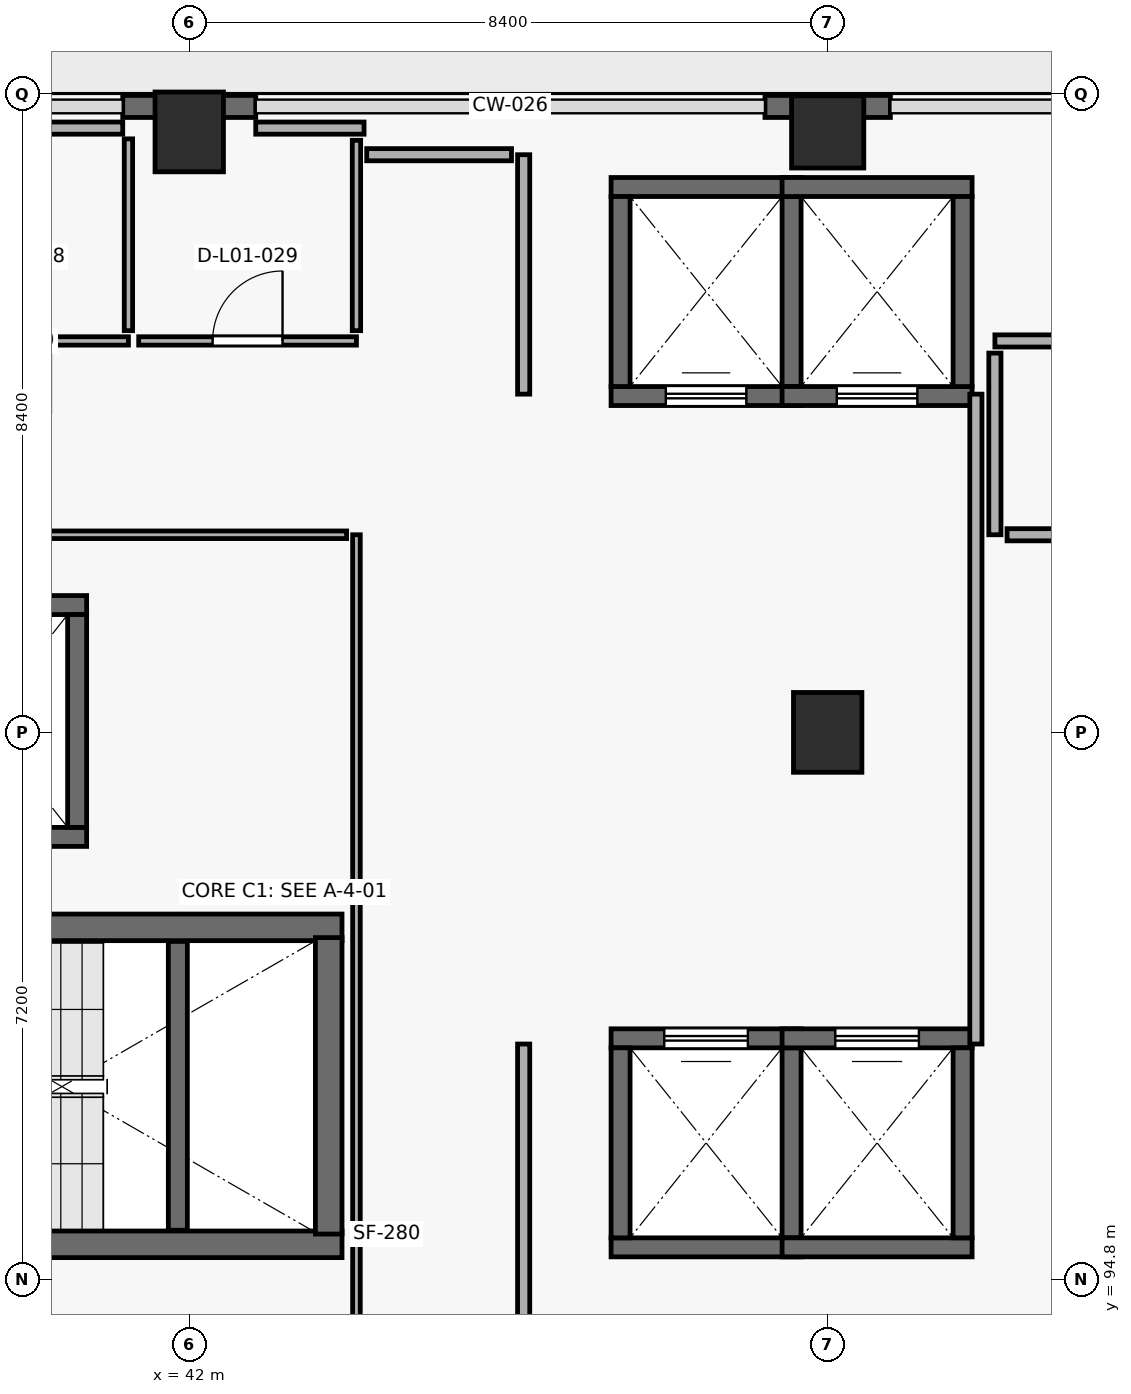
"""IFC4 building model, lengths in metres.
Left out: names, types, materials, properties, quantities, classifications, styles, units other than length and angle.
Written with IfcOpenShell. Run it as: python <this file> out.ifc"""

import sys

from ifc_helpers import new_model, si_unit, direction, frame, frame_2d, origin, origin_2d, place, context, subcontext, project, spatial, rectangle, extrude, element, fill, save


model = new_model("IFC4")
c1 = context("Model", 3, precision=1e-05, world=origin(), true_north=direction((0.0, 1.0)))
c2 = subcontext(c1, "Body", "Model", "MODEL_VIEW")
j1 = project(units=[si_unit("LENGTHUNIT", "METRE"), si_unit("PLANEANGLEUNIT", "RADIAN")], contexts=[c1])
p1 = place(None, origin())
s1 = spatial("IfcSite", under=j1, at=p1, CompositionType="ELEMENT")
p2 = place(p1, origin())
s2 = spatial("IfcBuilding", under=s1, at=p2, CompositionType="ELEMENT")
p3 = place(p2, origin())
s3 = spatial("IfcBuildingStorey", under=s2, at=p3, CompositionType="ELEMENT", Elevation=0.0)
for number, where, z_axis, x_axis in (
    (1, (42.0, 109.9, 0.0), (0.0, 0.0, 1.0), (1.0, 0.0, 0.0)),
    (2, (50.4, 102.0, 0.0), (0.0, 0.0, 1.0), (1.0, 0.0, 0.0)),
):
    element("IfcColumn", number, at=place(p3, frame(where, z_axis=z_axis, x_axis=x_axis)), inside=s3, PredefinedType="COLUMN", context=c2, shape_type="SweptSolid", body=[
        extrude(rectangle(XDim=0.9, YDim=1.05, at=origin_2d()), origin(), (0.0, 0.0, 1.0), 5.4),
    ])
p4 = place(p3, frame((50.4, 109.9, 0.0), z_axis=(0.0, 0.0, 1.0), x_axis=(1.0, 0.0, 0.0)))
e3 = element("IfcColumn", 3, at=p4, inside=s3, PredefinedType="COLUMN", context=c2, shape_type="SweptSolid", body=[
    extrude(rectangle(XDim=0.95, YDim=0.95, at=origin_2d()), origin(), (0.0, 0.0, 1.0), 5.4),
])
p5 = place(p3, frame((41.125, 110.235, 0.0), z_axis=(0.0, 0.0, 1.0), x_axis=(1.0, 0.0, 0.0)))
e4 = element("IfcWall", 4, at=p5, inside=s3, PredefinedType="SOLIDWALL", context=c2, shape_type="SweptSolid", body=[
    extrude(rectangle(XDim=1.75, YDim=0.29, at=frame_2d((0.875, 0.0))), origin(), (0.0, 0.0, 1.0), 5.12),
])
p6 = place(p3, frame((49.575, 110.235, 0.0), z_axis=(0.0, 0.0, 1.0), x_axis=(1.0, 0.0, 0.0)))
e5 = element("IfcWall", 5, at=p6, inside=s3, PredefinedType="SOLIDWALL", context=c2, shape_type="SweptSolid", body=[
    extrude(rectangle(XDim=1.65, YDim=0.29, at=frame_2d((0.825, 0.0))), origin(), (0.0, 0.0, 1.0), 5.12),
])
p7 = place(p3, frame((34.79, 95.265, 0.0), z_axis=(0.0, 0.0, 1.0), x_axis=(1.0, 0.0, 0.0)))
e6 = element("IfcWall", 6, at=p7, inside=s3, PredefinedType="SHEAR", context=c2, shape_type="SweptSolid", body=[
    extrude(rectangle(XDim=9.22, YDim=0.35, at=frame_2d((4.61, 0.0))), origin(), (0.0, 0.0, 1.0), 5.12),
])
p8 = place(p7, frame((0.45, 0.0, 0.0)))
e7 = element("IfcOpeningElement", 7, at=p8, cuts=e6, PredefinedType="OPENING", context=c2, shape_type="SweptSolid", body=[
    extrude(rectangle(XDim=1.25, YDim=2.2, at=frame_2d((0.625, 1.1))), frame((0.0, 0.185, 0.0), z_axis=(0.0, -1.0, 0.0), x_axis=(1.0, 0.0, 0.0)), (0.0, 0.0, 1.0), 0.37),
])
p9 = place(p3, frame((44.01, 99.435, 0.0), z_axis=(0.0, 0.0, 1.0), x_axis=(-1.0, 0.0, 0.0)))
e8 = element("IfcWall", 8, at=p9, inside=s3, PredefinedType="SHEAR", context=c2, shape_type="SweptSolid", body=[
    extrude(rectangle(XDim=9.22, YDim=0.35, at=frame_2d((4.61, 0.0))), origin(), (0.0, 0.0, 1.0), 5.12),
])
p10 = place(p9, frame((7.72, 0.0, 0.0)))
e9 = element("IfcOpeningElement", 9, at=p10, cuts=e8, PredefinedType="OPENING", context=c2, shape_type="SweptSolid", body=[
    extrude(rectangle(XDim=1.2, YDim=2.2, at=frame_2d((0.6, 1.1))), frame((0.0, 0.185, 0.0), z_axis=(0.0, -1.0, 0.0), x_axis=(1.0, 0.0, 0.0)), (0.0, 0.0, 1.0), 0.37),
])
p11 = place(p3, frame((43.835, 99.3, 0.0), z_axis=(0.0, 0.0, 1.0), x_axis=(0.0, -1.0, 0.0)))
e10 = element("IfcWall", 10, at=p11, inside=s3, PredefinedType="SHEAR", context=c2, shape_type="SweptSolid", body=[
    extrude(rectangle(XDim=3.9, YDim=0.35, at=frame_2d((1.95, 0.0))), origin(), (0.0, 0.0, 1.0), 5.12),
])
p12 = place(p3, frame((41.85, 95.45, 0.0), z_axis=(0.0, 0.0, 1.0), x_axis=(0.0, 1.0, 0.0)))
e11 = element("IfcWall", 11, at=p12, inside=s3, PredefinedType="SHEAR", context=c2, shape_type="SweptSolid", body=[
    extrude(rectangle(XDim=3.8, YDim=0.25, at=frame_2d((1.9, 0.0))), origin(), (0.0, 0.0, 1.0), 2.52),
])
p13 = place(p3, frame((47.55, 95.225, 0.0), z_axis=(0.0, 0.0, 1.0), x_axis=(1.0, 0.0, 0.0)))
e12 = element("IfcWall", 12, at=p13, inside=s3, PredefinedType="SHEAR", context=c2, shape_type="SweptSolid", body=[
    extrude(rectangle(XDim=2.5, YDim=0.25, at=frame_2d((1.25, 0.0))), origin(), (0.0, 0.0, 1.0), 5.12),
])
p14 = place(p3, frame((50.05, 97.975, 0.0), z_axis=(0.0, 0.0, 1.0), x_axis=(-1.0, 0.0, 0.0)))
e13 = element("IfcWall", 13, at=p14, inside=s3, PredefinedType="SHEAR", context=c2, shape_type="SweptSolid", body=[
    extrude(rectangle(XDim=2.5, YDim=0.25, at=frame_2d((1.25, 0.0))), origin(), (0.0, 0.0, 1.0), 5.12),
])
p15 = place(p14, frame((0.7, 0.0, 0.0)))
e14 = element("IfcOpeningElement", 14, at=p15, cuts=e13, PredefinedType="OPENING", context=c2, shape_type="SweptSolid", body=[
    extrude(rectangle(XDim=1.1, YDim=2.2, at=frame_2d((0.55, 1.1))), frame((0.0, 0.135, 0.0), z_axis=(0.0, -1.0, 0.0), x_axis=(1.0, 0.0, 0.0)), (0.0, 0.0, 1.0), 0.27),
])
for number, where, z_axis, x_axis in (
    (15, (47.675, 95.35, 0.0), (0.0, 0.0, 1.0), (0.0, 1.0, 0.0)),
    (16, (49.925, 97.85, 0.0), (0.0, 0.0, 1.0), (0.0, -1.0, 0.0)),
    (17, (49.8, 95.225, 0.0), (0.0, 0.0, 1.0), (1.0, 0.0, 0.0)),
):
    element("IfcWall", number, at=place(p3, frame(where, z_axis=z_axis, x_axis=x_axis)), inside=s3, PredefinedType="SHEAR", context=c2, shape_type="SweptSolid", body=[
        extrude(rectangle(XDim=2.5, YDim=0.25, at=frame_2d((1.25, 0.0))), origin(), (0.0, 0.0, 1.0), 5.12),
    ])
p16 = place(p3, frame((52.3, 97.975, 0.0), z_axis=(0.0, 0.0, 1.0), x_axis=(-1.0, 0.0, 0.0)))
e18 = element("IfcWall", 18, at=p16, inside=s3, PredefinedType="SHEAR", context=c2, shape_type="SweptSolid", body=[
    extrude(rectangle(XDim=2.5, YDim=0.25, at=frame_2d((1.25, 0.0))), origin(), (0.0, 0.0, 1.0), 5.12),
])
p17 = place(p16, frame((0.7, 0.0, 0.0)))
e19 = element("IfcOpeningElement", 19, at=p17, cuts=e18, PredefinedType="OPENING", context=c2, shape_type="SweptSolid", body=[
    extrude(rectangle(XDim=1.1, YDim=2.2, at=frame_2d((0.55, 1.1))), frame((0.0, 0.135, 0.0), z_axis=(0.0, -1.0, 0.0), x_axis=(1.0, 0.0, 0.0)), (0.0, 0.0, 1.0), 0.27),
])
p18 = place(p3, frame((52.175, 97.85, 0.0), z_axis=(0.0, 0.0, 1.0), x_axis=(0.0, -1.0, 0.0)))
e20 = element("IfcWall", 20, at=p18, inside=s3, PredefinedType="SHEAR", context=c2, shape_type="SweptSolid", body=[
    extrude(rectangle(XDim=2.5, YDim=0.25, at=frame_2d((1.25, 0.0))), origin(), (0.0, 0.0, 1.0), 5.12),
])
p19 = place(p3, frame((47.55, 106.425, 0.0), z_axis=(0.0, 0.0, 1.0), x_axis=(1.0, 0.0, 0.0)))
e21 = element("IfcWall", 21, at=p19, inside=s3, PredefinedType="SHEAR", context=c2, shape_type="SweptSolid", body=[
    extrude(rectangle(XDim=2.5, YDim=0.25, at=frame_2d((1.25, 0.0))), origin(), (0.0, 0.0, 1.0), 5.12),
])
p20 = place(p19, frame((0.72, 0.0, 0.0)))
e22 = element("IfcOpeningElement", 22, at=p20, cuts=e21, PredefinedType="OPENING", context=c2, shape_type="SweptSolid", body=[
    extrude(rectangle(XDim=1.06, YDim=2.2, at=frame_2d((0.53, 1.1))), frame((0.0, 0.135, 0.0), z_axis=(0.0, -1.0, 0.0), x_axis=(1.0, 0.0, 0.0)), (0.0, 0.0, 1.0), 0.27),
])
for number, where, z_axis, x_axis in (
    (23, (50.05, 109.175, 0.0), (0.0, 0.0, 1.0), (-1.0, 0.0, 0.0)),
    (24, (47.675, 106.55, 0.0), (0.0, 0.0, 1.0), (0.0, 1.0, 0.0)),
    (25, (49.925, 109.05, 0.0), (0.0, 0.0, 1.0), (0.0, -1.0, 0.0)),
):
    element("IfcWall", number, at=place(p3, frame(where, z_axis=z_axis, x_axis=x_axis)), inside=s3, PredefinedType="SHEAR", context=c2, shape_type="SweptSolid", body=[
        extrude(rectangle(XDim=2.5, YDim=0.25, at=frame_2d((1.25, 0.0))), origin(), (0.0, 0.0, 1.0), 5.12),
    ])
p21 = place(p3, frame((49.8, 106.425, 0.0), z_axis=(0.0, 0.0, 1.0), x_axis=(1.0, 0.0, 0.0)))
e26 = element("IfcWall", 26, at=p21, inside=s3, PredefinedType="SHEAR", context=c2, shape_type="SweptSolid", body=[
    extrude(rectangle(XDim=2.5, YDim=0.25, at=frame_2d((1.25, 0.0))), origin(), (0.0, 0.0, 1.0), 5.12),
])
p22 = place(p21, frame((0.72, 0.0, 0.0)))
e27 = element("IfcOpeningElement", 27, at=p22, cuts=e26, PredefinedType="OPENING", context=c2, shape_type="SweptSolid", body=[
    extrude(rectangle(XDim=1.06, YDim=2.2, at=frame_2d((0.53, 1.1))), frame((0.0, 0.135, 0.0), z_axis=(0.0, -1.0, 0.0), x_axis=(1.0, 0.0, 0.0)), (0.0, 0.0, 1.0), 0.27),
])
for number, where, z_axis, x_axis in (
    (28, (52.3, 109.175, 0.0), (0.0, 0.0, 1.0), (-1.0, 0.0, 0.0)),
    (29, (52.175, 109.05, 0.0), (0.0, 0.0, 1.0), (0.0, -1.0, 0.0)),
):
    element("IfcWall", number, at=place(p3, frame(where, z_axis=z_axis, x_axis=x_axis)), inside=s3, PredefinedType="SHEAR", context=c2, shape_type="SweptSolid", body=[
        extrude(rectangle(XDim=2.5, YDim=0.25, at=frame_2d((1.25, 0.0))), origin(), (0.0, 0.0, 1.0), 5.12),
    ])
for number, where, z_axis, x_axis in (
    (30, (37.95, 100.625, 0.0), (0.0, 0.0, 1.0), (1.0, 0.0, 0.0)),
    (31, (40.65, 103.675, 0.0), (0.0, 0.0, 1.0), (-1.0, 0.0, 0.0)),
):
    element("IfcWall", number, at=place(p3, frame(where, z_axis=z_axis, x_axis=x_axis)), inside=s3, PredefinedType="SHEAR", context=c2, shape_type="SweptSolid", body=[
        extrude(rectangle(XDim=2.7, YDim=0.25, at=frame_2d((1.35, 0.0))), origin(), (0.0, 0.0, 1.0), 5.12),
    ])
p23 = place(p3, frame((40.525, 103.55, 0.0), z_axis=(0.0, 0.0, 1.0), x_axis=(0.0, -1.0, 0.0)))
e32 = element("IfcWall", 32, at=p23, inside=s3, PredefinedType="SHEAR", context=c2, shape_type="SweptSolid", body=[
    extrude(rectangle(XDim=2.8, YDim=0.25, at=frame_2d((1.4, 0.0))), origin(), (0.0, 0.0, 1.0), 5.12),
])
p24 = place(p3, frame((44.2, 104.6, 0.0), z_axis=(0.0, 0.0, 1.0), x_axis=(0.0, -1.0, 0.0)))
e33 = element("IfcWall", 33, at=p24, inside=s3, PredefinedType="PARTITIONING", context=c2, shape_type="SweptSolid", body=[
    extrude(rectangle(XDim=10.75, YDim=0.1, at=frame_2d((5.375, 0.0))), origin(), (0.0, 0.0, 1.0), 5.12),
])
p25 = place(p3, frame((52.35, 97.9, 0.0), z_axis=(0.0, 0.0, 1.0), x_axis=(0.0, 1.0, 0.0)))
e34 = element("IfcWall", 34, at=p25, inside=s3, PredefinedType="PARTITIONING", context=c2, shape_type="SweptSolid", body=[
    extrude(rectangle(XDim=8.55, YDim=0.16, at=frame_2d((4.275, 0.0))), origin(), (0.0, 0.0, 1.0), 5.12),
])
p26 = place(p3, frame((60.1, 107.15, 0.0), z_axis=(0.0, 0.0, 1.0), x_axis=(-1.0, 0.0, 0.0)))
e35 = element("IfcWall", 35, at=p26, inside=s3, PredefinedType="PARTITIONING", context=c2, shape_type="SweptSolid", body=[
    extrude(rectangle(XDim=7.5, YDim=0.16, at=frame_2d((3.75, 0.0))), origin(), (0.0, 0.0, 1.0), 5.12),
])
p27 = place(p3, frame((44.3, 109.95, 0.0), z_axis=(0.0, 0.0, 1.0), x_axis=(-1.0, 0.0, 0.0)))
e36 = element("IfcWall", 36, at=p27, inside=s3, PredefinedType="PARTITIONING", context=c2, shape_type="SweptSolid", body=[
    extrude(rectangle(XDim=1.425, YDim=0.16, at=frame_2d((0.712, 0.0))), origin(), (0.0, 0.0, 1.0), 4.36),
])
p28 = place(p3, frame((41.125, 109.95, 0.0), z_axis=(0.0, 0.0, 1.0), x_axis=(-1.0, 0.0, 0.0)))
e37 = element("IfcWall", 37, at=p28, inside=s3, PredefinedType="PARTITIONING", context=c2, shape_type="SweptSolid", body=[
    extrude(rectangle(XDim=3.025, YDim=0.16, at=frame_2d((1.512, 0.0))), origin(), (0.0, 0.0, 1.0), 4.36),
])
p29 = place(p3, frame((38.48, 104.6, 0.0), z_axis=(0.0, 0.0, 1.0), x_axis=(1.0, 0.0, 0.0)))
e38 = element("IfcWall", 38, at=p29, inside=s3, PredefinedType="PARTITIONING", context=c2, shape_type="SweptSolid", body=[
    extrude(rectangle(XDim=5.59, YDim=0.1, at=frame_2d((2.795, 0.0))), origin(), (0.0, 0.0, 1.0), 5.12),
])
p30 = place(p3, frame((46.4, 94.01, 0.0), z_axis=(0.0, 0.0, 1.0), x_axis=(0.0, 1.0, 0.0)))
e39 = element("IfcWall", 39, at=p30, inside=s3, PredefinedType="PARTITIONING", context=c2, shape_type="SweptSolid", body=[
    extrude(rectangle(XDim=3.89, YDim=0.16, at=frame_2d((1.945, 0.0))), origin(), (0.0, 0.0, 1.0), 5.12),
])
p31 = place(p3, frame((46.4, 106.45, 0.0), z_axis=(0.0, 0.0, 1.0), x_axis=(0.0, 1.0, 0.0)))
e40 = element("IfcWall", 40, at=p31, inside=s3, PredefinedType="PARTITIONING", context=c2, shape_type="SweptSolid", body=[
    extrude(rectangle(XDim=3.15, YDim=0.16, at=frame_2d((1.575, 0.0))), origin(), (0.0, 0.0, 1.0), 5.12),
])
p32 = place(p3, frame((41.2, 107.15, 0.0), z_axis=(0.0, 0.0, 1.0), x_axis=(-1.0, 0.0, 0.0)))
e41 = element("IfcWall", 41, at=p32, inside=s3, PredefinedType="PARTITIONING", context=c2, shape_type="SweptSolid", body=[
    extrude(rectangle(XDim=3.0, YDim=0.11, at=frame_2d((1.5, 0.0))), origin(), (0.0, 0.0, 1.0), 5.12),
])
p33 = place(p32, frame((1.02, 0.0, 0.0)))
e42 = element("IfcOpeningElement", 42, at=p33, cuts=e41, PredefinedType="OPENING", context=c2, shape_type="SweptSolid", body=[
    extrude(rectangle(XDim=0.96, YDim=2.14, at=frame_2d((0.48, 1.07))), frame((0.0, 0.065, 0.0), z_axis=(0.0, -1.0, 0.0), x_axis=(1.0, 0.0, 0.0)), (0.0, 0.0, 1.0), 0.13),
])
p34 = place(p3, frame((44.2, 107.15, 0.0), z_axis=(0.0, 0.0, 1.0), x_axis=(-1.0, 0.0, 0.0)))
e43 = element("IfcWall", 43, at=p34, inside=s3, PredefinedType="PARTITIONING", context=c2, shape_type="SweptSolid", body=[
    extrude(rectangle(XDim=2.865, YDim=0.11, at=frame_2d((1.433, 0.0))), origin(), (0.0, 0.0, 1.0), 5.12),
])
p35 = place(p34, frame((0.972, 0.0, 0.0)))
e44 = element("IfcOpeningElement", 44, at=p35, cuts=e43, PredefinedType="OPENING", context=c2, shape_type="SweptSolid", body=[
    extrude(rectangle(XDim=0.92, YDim=2.12, at=frame_2d((0.46, 1.06))), frame((0.0, 0.065, 0.0), z_axis=(0.0, -1.0, 0.0), x_axis=(1.0, 0.0, 0.0)), (0.0, 0.0, 1.0), 0.13),
])
p36 = place(p3, frame((41.2, 109.809, 0.0), z_axis=(0.0, 0.0, 1.0), x_axis=(0.0, -1.0, 0.0)))
e45 = element("IfcWall", 45, at=p36, inside=s3, PredefinedType="PARTITIONING", context=c2, shape_type="SweptSolid", body=[
    extrude(rectangle(XDim=2.524, YDim=0.11, at=frame_2d((1.262, 0.0))), origin(), (0.0, 0.0, 1.0), 5.12),
])
p37 = place(p3, frame((44.2, 109.79, 0.0), z_axis=(0.0, 0.0, 1.0), x_axis=(0.0, -1.0, 0.0)))
e46 = element("IfcWall", 46, at=p37, inside=s3, PredefinedType="PARTITIONING", context=c2, shape_type="SweptSolid", body=[
    extrude(rectangle(XDim=2.505, YDim=0.11, at=frame_2d((1.252, 0.0))), origin(), (0.0, 0.0, 1.0), 5.12),
])
p38 = place(p3, frame((52.6, 106.99, 0.0), z_axis=(0.0, 0.0, 1.0), x_axis=(0.0, -1.0, 0.0)))
e47 = element("IfcWall", 47, at=p38, inside=s3, PredefinedType="PARTITIONING", context=c2, shape_type="SweptSolid", body=[
    extrude(rectangle(XDim=2.39, YDim=0.16, at=frame_2d((1.195, 0.0))), origin(), (0.0, 0.0, 1.0), 5.12),
])
p39 = place(p3, frame((52.76, 104.6, 0.0), z_axis=(0.0, 0.0, 1.0), x_axis=(1.0, 0.0, 0.0)))
e48 = element("IfcWall", 48, at=p39, inside=s3, PredefinedType="PARTITIONING", context=c2, shape_type="SweptSolid", body=[
    extrude(rectangle(XDim=2.32, YDim=0.16, at=frame_2d((1.16, 0.0))), origin(), (0.0, 0.0, 1.0), 5.12),
])
p40 = place(p3, frame((46.24, 109.6, 0.0), z_axis=(0.0, 0.0, 1.0), x_axis=(-1.0, 0.0, 0.0)))
e49 = element("IfcWall", 49, at=p40, inside=s3, PredefinedType="PARTITIONING", context=c2, shape_type="SweptSolid", body=[
    extrude(rectangle(XDim=1.905, YDim=0.16, at=frame_2d((0.953, 0.0))), origin(), (0.0, 0.0, 1.0), 4.36),
])
p41 = place(p15, origin())
e50 = element("IfcDoor", 50, at=p41, inside=s3, OperationType="SLIDING_TO_RIGHT", PredefinedType="DOOR", context=c2, shape_type="SweptSolid", body=[
    extrude(rectangle(XDim=1.1, YDim=2.2, at=frame_2d((0.55, 1.1))), frame((0.0, 0.025, 0.0), z_axis=(0.0, -1.0, 0.0), x_axis=(1.0, 0.0, 0.0)), (0.0, 0.0, 1.0), 0.05),
])
fill(e14, e50)
p42 = place(p17, origin())
e51 = element("IfcDoor", 51, at=p42, inside=s3, OperationType="SLIDING_TO_RIGHT", PredefinedType="DOOR", context=c2, shape_type="SweptSolid", body=[
    extrude(rectangle(XDim=1.1, YDim=2.2, at=frame_2d((0.55, 1.1))), frame((0.0, 0.025, 0.0), z_axis=(0.0, -1.0, 0.0), x_axis=(1.0, 0.0, 0.0)), (0.0, 0.0, 1.0), 0.05),
])
fill(e19, e51)
p43 = place(p20, origin())
e52 = element("IfcDoor", 52, at=p43, inside=s3, OperationType="SLIDING_TO_RIGHT", PredefinedType="DOOR", context=c2, shape_type="SweptSolid", body=[
    extrude(rectangle(XDim=1.06, YDim=2.2, at=frame_2d((0.53, 1.1))), frame((0.0, 0.025, 0.0), z_axis=(0.0, -1.0, 0.0), x_axis=(1.0, 0.0, 0.0)), (0.0, 0.0, 1.0), 0.05),
])
fill(e22, e52)
p44 = place(p22, origin())
e53 = element("IfcDoor", 53, at=p44, inside=s3, OperationType="SLIDING_TO_RIGHT", PredefinedType="DOOR", context=c2, shape_type="SweptSolid", body=[
    extrude(rectangle(XDim=1.06, YDim=2.2, at=frame_2d((0.53, 1.1))), frame((0.0, 0.025, 0.0), z_axis=(0.0, -1.0, 0.0), x_axis=(1.0, 0.0, 0.0)), (0.0, 0.0, 1.0), 0.05),
])
fill(e27, e53)
p45 = place(p35, origin())
e54 = element("IfcDoor", 54, at=p45, inside=s3, OperationType="SINGLE_SWING_RIGHT", PredefinedType="DOOR", context=c2, shape_type="SweptSolid", body=[
    extrude(rectangle(XDim=0.92, YDim=2.12, at=frame_2d((0.46, 1.06))), frame((0.0, 0.025, 0.0), z_axis=(0.0, -1.0, 0.0), x_axis=(1.0, 0.0, 0.0)), (0.0, 0.0, 1.0), 0.05),
])
fill(e44, e54)
save(model, sys.argv[1])
